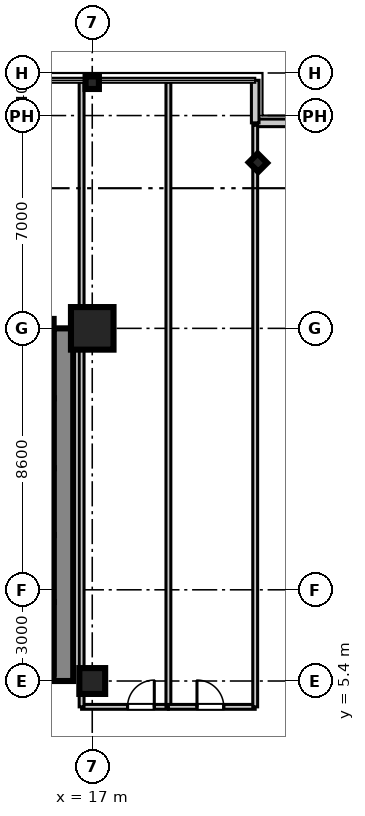
"""IFC4 building model, lengths in metres.
Left out: names, types, materials, properties, quantities, classifications, styles, units other than length and angle.
Written with IfcOpenShell. Run it as: python <this file> out.ifc"""

import sys

from ifc_helpers import new_model, si_unit, direction, frame, frame_2d, origin, origin_2d, place, context, subcontext, project, spatial, rectangle, i_section, extrude, source, transform, mapped, element, fill, save


model = new_model("IFC4")
c1 = context("Model", 3, precision=1e-05, world=origin(), true_north=direction((0.0, 1.0)))
c2 = subcontext(c1, "Body", "Model", "MODEL_VIEW")
j1 = project(units=[si_unit("LENGTHUNIT", "METRE"), si_unit("PLANEANGLEUNIT", "RADIAN")], contexts=[c1])
p1 = place(None, origin())
s1 = spatial("IfcSite", under=j1, at=p1, CompositionType="ELEMENT")
p2 = place(p1, origin())
s2 = spatial("IfcBuilding", under=s1, at=p2, CompositionType="ELEMENT")
p3 = place(p2, frame((0.0, 0.0, 61.6)))
s3 = spatial("IfcBuildingStorey", under=s2, at=p3, CompositionType="ELEMENT", Elevation=61.6)
m1 = source(origin(), c2, "Body", "SweptSolid", [
    extrude(rectangle(XDim=0.85, YDim=0.85, at=origin_2d()), origin(), (0.0, 0.0, 1.0), 3.605),
])
p4 = place(p3, frame((17.0, 5.4, 0.0), z_axis=(0.0, 0.0, 1.0), x_axis=(1.0, 0.0, 0.0)))
e1 = element("IfcColumn", 1, at=p4, inside=s3, PredefinedType="PILASTER", context=c2, shape_type="MappedRepresentation", body=[
    mapped(m1, transform((0.0, 0.0, 0.0), scale=1.0)),
])
m2 = source(origin(), c2, "Body", "SweptSolid", [
    extrude(rectangle(XDim=1.4, YDim=1.4, at=origin_2d()), origin(), (0.0, 0.0, 1.0), 3.605),
])
p5 = place(p3, frame((17.0, 17.0, 0.0), z_axis=(0.0, 0.0, 1.0), x_axis=(1.0, 0.0, 0.0)))
e2 = element("IfcColumn", 2, at=p5, inside=s3, PredefinedType="COLUMN", context=c2, shape_type="MappedRepresentation", body=[
    mapped(m2, transform((0.0, 0.0, 0.0), scale=1.0)),
])
m3 = source(origin(), c2, "Body", "SweptSolid", [
    extrude(i_section(OverallWidth=0.412, OverallDepth=0.438, WebThickness=0.023, FlangeThickness=0.036, at=origin_2d()), origin(), (0.0, 0.0, 1.0), 3.605),
])
for number, where, z_axis, x_axis in (
    (3, (17.0, 25.08, 0.0), (0.0, 0.0, 1.0), (0.0, 1.0, 0.0)),
    (4, (22.45, 22.45, 0.0), (0.0, 0.0, 1.0), (0.707, 0.707, 0.0)),
):
    element("IfcColumn", number, at=place(p3, frame(where, z_axis=z_axis, x_axis=x_axis)), inside=s3, PredefinedType="COLUMN", context=c2, shape_type="MappedRepresentation", body=[
        mapped(m3, transform((0.0, 0.0, 0.0), scale=1.0)),
    ])
m4 = source(origin(), c2, "Body", "SweptSolid", [
    extrude(rectangle(XDim=11.6, YDim=0.65, at=frame_2d((5.8, 0.0))), origin(), (0.0, 0.0, 1.0), 3.37),
])
p6 = place(p3, frame((16.05, 5.4, 0.0), z_axis=(0.0, 0.0, 1.0), x_axis=(0.0, 1.0, 0.0)))
e5 = element("IfcWall", 5, at=p6, inside=s3, PredefinedType="SHEAR", context=c2, shape_type="MappedRepresentation", body=[
    mapped(m4, transform((0.0, 0.0, 0.0), scale=1.0)),
])
m5 = source(origin(), c2, "Body", "SweptSolid", [
    extrude(rectangle(XDim=2.36, YDim=0.22, at=frame_2d((1.18, 0.0))), origin(), (0.0, 0.0, 1.0), 3.37),
])
p7 = place(p3, frame((15.62, 5.64, 0.0), z_axis=(0.0, 0.0, 1.0), x_axis=(0.0, 1.0, 0.0)))
e6 = element("IfcWall", 6, at=p7, inside=s3, PredefinedType="SHEAR", context=c2, shape_type="MappedRepresentation", body=[
    mapped(m5, transform((0.0, 0.0, 0.0), scale=1.0)),
])
m6 = source(origin(), c2, "Body", "SweptSolid", [
    extrude(rectangle(XDim=2.2, YDim=0.22, at=frame_2d((1.1, 0.0))), origin(), (0.0, 0.0, 1.0), 3.37),
])
for number, where, z_axis, x_axis in (
    (7, (15.62, 8.0, 0.0), (0.0, 0.0, 1.0), (0.0, 1.0, 0.0)),
    (8, (15.62, 10.2, 0.0), (0.0, 0.0, 1.0), (0.0, 1.0, 0.0)),
):
    element("IfcWall", number, at=place(p3, frame(where, z_axis=z_axis, x_axis=x_axis)), inside=s3, PredefinedType="SHEAR", context=c2, shape_type="MappedRepresentation", body=[
        mapped(m6, transform((0.0, 0.0, 0.0), scale=1.0)),
    ])
m7 = source(origin(), c2, "Body", "SweptSolid", [
    extrude(rectangle(XDim=2.3, YDim=0.22, at=frame_2d((1.15, 0.0))), origin(), (0.0, 0.0, 1.0), 3.37),
])
p8 = place(p3, frame((15.62, 12.4, 0.0), z_axis=(0.0, 0.0, 1.0), x_axis=(0.0, 1.0, 0.0)))
e9 = element("IfcWall", 9, at=p8, inside=s3, PredefinedType="SHEAR", context=c2, shape_type="MappedRepresentation", body=[
    mapped(m7, transform((0.0, 0.0, 0.0), scale=1.0)),
])
m8 = source(origin(), c2, "Body", "SweptSolid", [
    extrude(rectangle(XDim=2.61, YDim=0.22, at=frame_2d((1.305, 0.0))), origin(), (0.0, 0.0, 1.0), 3.37),
])
p9 = place(p3, frame((15.62, 14.7, 0.0), z_axis=(0.0, 0.0, 1.0), x_axis=(0.0, 1.0, 0.0)))
e10 = element("IfcWall", 10, at=p9, inside=s3, PredefinedType="SHEAR", context=c2, shape_type="MappedRepresentation", body=[
    mapped(m8, transform((0.0, 0.0, 0.0), scale=1.0)),
])
m9 = source(origin(), c2, "Body", "SweptSolid", [
    extrude(rectangle(XDim=1.4, YDim=0.25, at=frame_2d((0.7, 0.0))), origin(), (0.0, 0.0, 1.0), 3.37),
])
for number, where, z_axis, x_axis in (
    (11, (22.36, 23.76, 0.0), (0.0, 0.0, 1.0), (1.0, 0.0, 0.0)),
    (12, (22.36, 23.76, 0.0), (0.0, 0.0, 1.0), (0.0, 1.0, 0.0)),
):
    element("IfcWall", number, at=place(p3, frame(where, z_axis=z_axis, x_axis=x_axis)), inside=s3, PredefinedType="STANDARD", context=c2, shape_type="MappedRepresentation", body=[
        mapped(m9, transform((0.0, 0.0, 0.0), scale=1.0)),
    ])
m10 = source(origin(), c2, "Body", "SweptSolid", [
    extrude(rectangle(XDim=2.855, YDim=0.16, at=frame_2d((1.427, 0.0))), origin(), (0.0, 0.0, 1.0), 2.71),
])
p10 = place(p3, frame((16.65, 4.55, 0.0), z_axis=(0.0, 0.0, 1.0), x_axis=(1.0, 0.0, 0.0)))
e13 = element("IfcWall", 13, at=p10, inside=s3, PredefinedType="PARTITIONING", context=c2, shape_type="MappedRepresentation", body=[
    mapped(m10, transform((0.0, 0.0, 0.0), scale=1.0)),
])
p11 = place(p10, frame((1.511, 0.0, 0.0)))
e14 = element("IfcOpeningElement", 14, at=p11, cuts=e13, PredefinedType="OPENING", context=c2, shape_type="SweptSolid", body=[
    extrude(rectangle(XDim=0.88, YDim=2.1, at=frame_2d((0.44, 1.05))), frame((0.0, 0.09, 0.0), z_axis=(0.0, -1.0, 0.0), x_axis=(1.0, 0.0, 0.0)), (0.0, 0.0, 1.0), 0.18),
])
m11 = source(origin(), c2, "Body", "SweptSolid", [
    extrude(rectangle(XDim=20.55, YDim=0.16, at=frame_2d((10.275, 0.0))), origin(), (0.0, 0.0, 1.0), 2.71),
])
for number, where, z_axis, x_axis in (
    (15, (16.65, 4.55, 0.0), (0.0, 0.0, 1.0), (0.0, 1.0, 0.0)),
    (16, (19.505, 4.55, 0.0), (0.0, 0.0, 1.0), (0.0, 1.0, 0.0)),
):
    element("IfcWall", number, at=place(p3, frame(where, z_axis=z_axis, x_axis=x_axis)), inside=s3, PredefinedType="PARTITIONING", context=c2, shape_type="MappedRepresentation", body=[
        mapped(m11, transform((0.0, 0.0, 0.0), scale=1.0)),
    ])
m12 = source(origin(), c2, "Body", "SweptSolid", [
    extrude(rectangle(XDim=2.855, YDim=0.16, at=frame_2d((1.428, 0.0))), origin(), (0.0, 0.0, 1.0), 2.71),
])
p12 = place(p3, frame((19.505, 4.55, 0.0), z_axis=(0.0, 0.0, 1.0), x_axis=(1.0, 0.0, 0.0)))
e17 = element("IfcWall", 17, at=p12, inside=s3, PredefinedType="PARTITIONING", context=c2, shape_type="MappedRepresentation", body=[
    mapped(m12, transform((0.0, 0.0, 0.0), scale=1.0)),
])
p13 = place(p12, frame((0.94, 0.0, 0.0)))
e18 = element("IfcOpeningElement", 18, at=p13, cuts=e17, PredefinedType="OPENING", context=c2, shape_type="SweptSolid", body=[
    extrude(rectangle(XDim=0.88, YDim=2.1, at=frame_2d((0.44, 1.05))), frame((0.0, 0.09, 0.0), z_axis=(0.0, -1.0, 0.0), x_axis=(1.0, 0.0, 0.0)), (0.0, 0.0, 1.0), 0.18),
])
m13 = source(origin(), c2, "Body", "SweptSolid", [
    extrude(rectangle(XDim=19.13, YDim=0.16, at=frame_2d((9.565, 0.0))), origin(), (0.0, 0.0, 1.0), 2.71),
])
p14 = place(p3, frame((22.36, 4.55, 0.0), z_axis=(0.0, 0.0, 1.0), x_axis=(0.0, 1.0, 0.0)))
e19 = element("IfcWall", 19, at=p14, inside=s3, PredefinedType="PARTITIONING", context=c2, shape_type="MappedRepresentation", body=[
    mapped(m13, transform((0.0, 0.0, 0.0), scale=1.0)),
])
m14 = source(origin(), c2, "Body", "SweptSolid", [
    extrude(rectangle(XDim=0.88, YDim=2.1, at=frame_2d((0.44, 1.05))), frame((0.0, 0.025, 0.0), z_axis=(0.0, -1.0, 0.0), x_axis=(1.0, 0.0, 0.0)), (0.0, 0.0, 1.0), 0.05),
])
p15 = place(p11, origin())
e20 = element("IfcDoor", 20, at=p15, inside=s3, OperationType="SINGLE_SWING_RIGHT", PredefinedType="DOOR", context=c2, shape_type="MappedRepresentation", body=[
    mapped(m14, transform((0.0, 0.0, 0.0), scale=1.0)),
])
fill(e14, e20)
p16 = place(p13, origin())
e21 = element("IfcDoor", 21, at=p16, inside=s3, OperationType="SINGLE_SWING_LEFT", PredefinedType="DOOR", context=c2, shape_type="MappedRepresentation", body=[
    mapped(m14, transform((0.0, 0.0, 0.0), scale=1.0)),
])
fill(e18, e21)
save(model, sys.argv[1])
